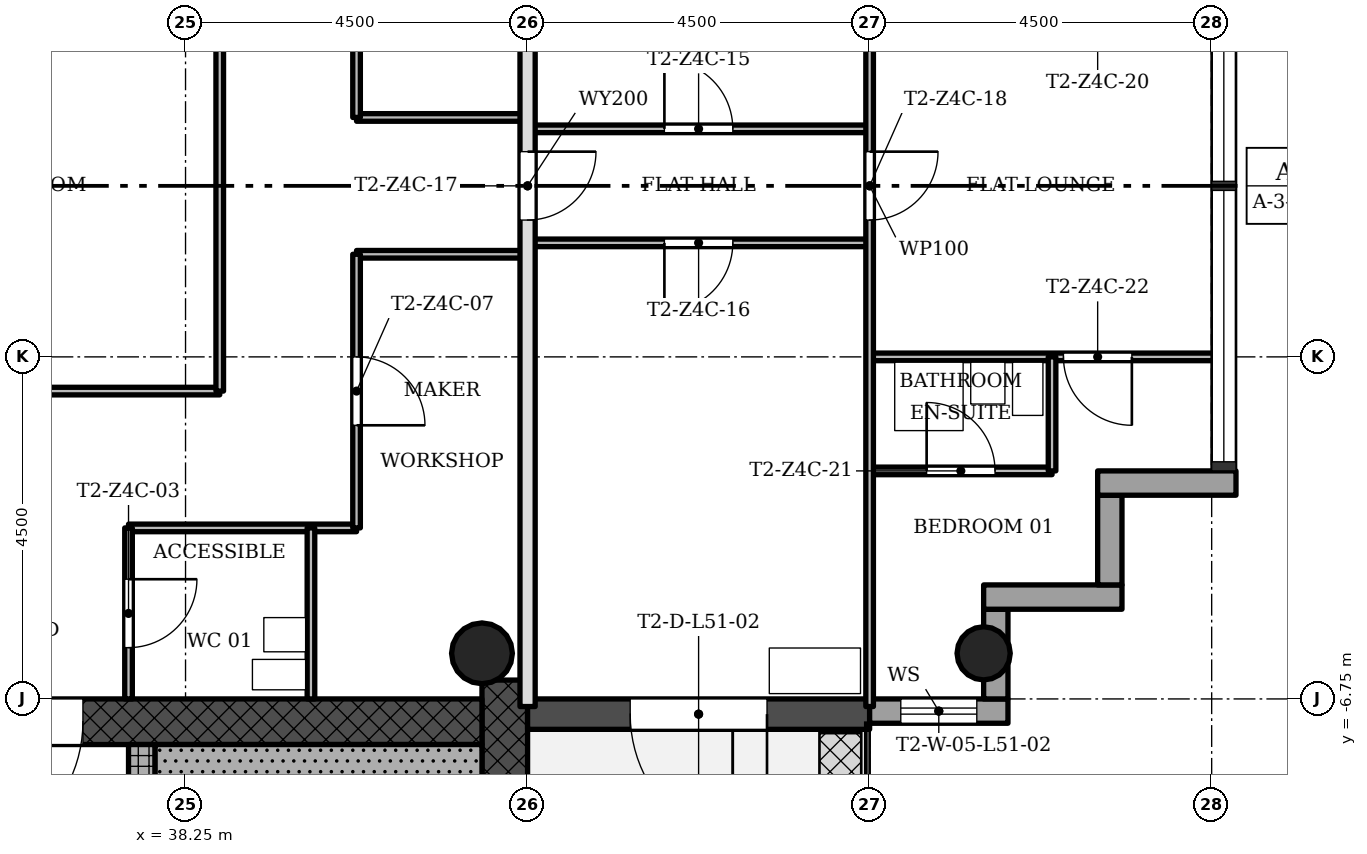
"""IFC4 building model, lengths in metres.
Left out: names, types, materials, properties, quantities, classifications, styles, units other than length and angle.
Written with IfcOpenShell. Run it as: python <this file> out.ifc"""

import sys

from ifc_helpers import new_model, si_unit, direction, frame, frame_2d, origin, origin_2d, place, context, subcontext, project, spatial, rectangle, hollow_circle, extrude, element, fill, save


model = new_model("IFC4")
c1 = context("Model", 3, precision=1e-05, world=origin(), true_north=direction((0.0, 1.0)))
c2 = subcontext(c1, "Body", "Model", "MODEL_VIEW")
j1 = project(units=[si_unit("LENGTHUNIT", "METRE"), si_unit("PLANEANGLEUNIT", "RADIAN")], contexts=[c1])
p1 = place(None, origin())
s1 = spatial("IfcSite", under=j1, at=p1, CompositionType="ELEMENT")
p2 = place(p1, origin())
s2 = spatial("IfcBuilding", under=s1, at=p2, CompositionType="ELEMENT")
p3 = place(p2, frame((0.0, 0.0, 185.8)))
s3 = spatial("IfcBuildingStorey", under=s2, at=p3, CompositionType="ELEMENT", Elevation=185.8)
p4 = place(p3, frame((42.45, -15.15, 0.0), z_axis=(0.0, 0.0, 1.0), x_axis=(0.0, 1.0, 0.0)))
e1 = element("IfcWall", 1, at=p4, inside=s3, PredefinedType="SHEAR", context=c2, shape_type="SweptSolid", body=[
    extrude(rectangle(XDim=8.648, YDim=0.6, at=frame_2d((4.324, 0.0))), origin(), (0.0, 0.0, 1.0), 3.4),
])
p5 = place(p3, frame((42.15, -7.05, 0.0), z_axis=(0.0, 0.0, 1.0), x_axis=(-1.0, 0.0, 0.0)))
e2 = element("IfcWall", 2, at=p5, inside=s3, PredefinedType="SHEAR", context=c2, shape_type="SweptSolid", body=[
    extrude(rectangle(XDim=12.9, YDim=0.6, at=frame_2d((6.45, 0.0))), origin(), (0.0, 0.0, 1.0), 3.4),
])
p6 = place(p5, frame((5.25, 0.0, 0.0)))
e3 = element("IfcOpeningElement", 3, at=p6, cuts=e2, PredefinedType="OPENING", context=c2, shape_type="SweptSolid", body=[
    extrude(rectangle(XDim=1.8, YDim=2.1, at=frame_2d((0.9, 1.05))), frame((0.0, 0.31, 0.0), z_axis=(0.0, -1.0, 0.0), x_axis=(1.0, 0.0, 0.0)), (0.0, 0.0, 1.0), 0.62),
])
p7 = place(p3, frame((37.675, -15.15, 0.0), z_axis=(0.0, 0.0, 1.0), x_axis=(0.0, 1.0, 0.0)))
e4 = element("IfcWall", 4, at=p7, inside=s3, PredefinedType="SHEAR", context=c2, shape_type="SweptSolid", body=[
    extrude(rectangle(XDim=7.8, YDim=0.35, at=frame_2d((3.9, 0.0))), origin(), (0.0, 0.0, 1.0), 3.4),
])
p8 = place(p7, frame((5.85, 0.0, 0.0)))
e5 = element("IfcOpeningElement", 5, at=p8, cuts=e4, PredefinedType="OPENING", context=c2, shape_type="SweptSolid", body=[
    extrude(rectangle(XDim=0.9, YDim=2.1, at=frame_2d((0.45, 1.05))), frame((0.0, 0.185, 0.0), z_axis=(0.0, -1.0, 0.0), x_axis=(1.0, 0.0, 0.0)), (0.0, 0.0, 1.0), 0.37),
])
p9 = place(p3, frame((48.75, -6.15, 0.0), z_axis=(0.0, 0.0, 1.0), x_axis=(1.0, 0.0, 0.0)))
e6 = element("IfcColumn", 6, at=p9, inside=s3, PredefinedType="COLUMN", context=c2, shape_type="SweptSolid", body=[
    extrude(hollow_circle(Radius=0.35, WallThickness=0.025, at=origin_2d()), origin(), (0.0, 0.0, 1.0), 3.4),
])
p10 = place(p3, frame((42.15, -6.15, 0.0), z_axis=(0.0, 0.0, 1.0), x_axis=(1.0, 0.0, 0.0)))
e7 = element("IfcColumn", 7, at=p10, inside=s3, PredefinedType="COLUMN", context=c2, shape_type="SweptSolid", body=[
    extrude(hollow_circle(Radius=0.4, WallThickness=0.028, at=origin_2d()), origin(), (0.0, 0.0, 1.0), 3.4),
])
p11 = place(p3, frame((42.75, -6.95, -0.02), z_axis=(0.0, 0.0, 1.0), x_axis=(1.0, 0.0, 0.0)))
e8 = element("IfcWall", 8, at=p11, inside=s3, PredefinedType="STANDARD", context=c2, shape_type="SweptSolid", body=[
    extrude(rectangle(XDim=4.5, YDim=0.4, at=frame_2d((2.25, 0.0))), origin(), (0.0, 0.0, 1.0), 3.12),
])
p12 = place(p11, frame((1.35, 0.0, 0.02)))
e9 = element("IfcOpeningElement", 9, at=p12, cuts=e8, PredefinedType="OPENING", context=c2, shape_type="SweptSolid", body=[
    extrude(rectangle(XDim=1.8, YDim=2.1, at=frame_2d((0.9, 1.05))), frame((0.0, 0.21, 0.0), z_axis=(0.0, -1.0, 0.0), x_axis=(1.0, 0.0, 0.0)), (0.0, 0.0, 1.0), 0.42),
])
p13 = place(p3, frame((47.25, -6.91, -0.3), z_axis=(0.0, 0.0, 1.0), x_axis=(1.0, 0.0, 0.0)))
e10 = element("IfcWall", 10, at=p13, inside=s3, PredefinedType="STANDARD", context=c2, shape_type="SweptSolid", body=[
    extrude(rectangle(XDim=1.82, YDim=0.32, at=frame_2d((0.91, 0.0))), origin(), (0.0, 0.0, 1.0), 3.4),
])
p14 = place(p13, frame((0.41, 0.0, 1.2)))
e11 = element("IfcOpeningElement", 11, at=p14, cuts=e10, PredefinedType="OPENING", context=c2, shape_type="SweptSolid", body=[
    extrude(rectangle(XDim=1.0, YDim=1.5, at=frame_2d((0.5, 0.75))), frame((0.0, 0.17, 0.0), z_axis=(0.0, -1.0, 0.0), x_axis=(1.0, 0.0, 0.0)), (0.0, 0.0, 1.0), 0.34),
])
p15 = place(p3, frame((48.91, -6.75, -0.3), z_axis=(0.0, 0.0, 1.0), x_axis=(0.0, 1.0, 0.0)))
e12 = element("IfcWall", 12, at=p15, inside=s3, PredefinedType="STANDARD", context=c2, shape_type="SweptSolid", body=[
    extrude(rectangle(XDim=1.18, YDim=0.32, at=frame_2d((0.59, 0.0))), origin(), (0.0, 0.0, 1.0), 3.4),
])
p16 = place(p3, frame((48.75, -5.41, -0.3), z_axis=(0.0, 0.0, 1.0), x_axis=(1.0, 0.0, 0.0)))
e13 = element("IfcWall", 13, at=p16, inside=s3, PredefinedType="STANDARD", context=c2, shape_type="SweptSolid", body=[
    extrude(rectangle(XDim=1.82, YDim=0.32, at=frame_2d((0.91, 0.0))), origin(), (0.0, 0.0, 1.0), 3.4),
])
p17 = place(p3, frame((50.41, -5.25, -0.3), z_axis=(0.0, 0.0, 1.0), x_axis=(0.0, 1.0, 0.0)))
e14 = element("IfcWall", 14, at=p17, inside=s3, PredefinedType="STANDARD", context=c2, shape_type="SweptSolid", body=[
    extrude(rectangle(XDim=1.18, YDim=0.32, at=frame_2d((0.59, 0.0))), origin(), (0.0, 0.0, 1.0), 3.4),
])
p18 = place(p3, frame((50.25, -3.91, -0.3), z_axis=(0.0, 0.0, 1.0), x_axis=(1.0, 0.0, 0.0)))
e15 = element("IfcWall", 15, at=p18, inside=s3, PredefinedType="STANDARD", context=c2, shape_type="SweptSolid", body=[
    extrude(rectangle(XDim=1.82, YDim=0.32, at=frame_2d((0.91, 0.0))), origin(), (0.0, 0.0, 1.0), 3.4),
])
p19 = place(p3, frame((40.5, -4.5, 0.0), z_axis=(0.0, 0.0, 1.0), x_axis=(-1.0, 0.0, 0.0)))
e16 = element("IfcWall", 16, at=p19, inside=s3, PredefinedType="PARTITIONING", context=c2, shape_type="SweptSolid", body=[
    extrude(rectangle(XDim=3.0, YDim=0.1, at=frame_2d((1.5, 0.0))), origin(), (0.0, 0.0, 1.0), 3.0),
])
p20 = place(p3, frame((49.65, -3.75, 0.0), z_axis=(0.0, 0.0, 1.0), x_axis=(-1.0, 0.0, 0.0)))
e17 = element("IfcWall", 17, at=p20, inside=s3, PredefinedType="PARTITIONING", context=c2, shape_type="SweptSolid", body=[
    extrude(rectangle(XDim=2.4, YDim=0.1, at=frame_2d((1.2, 0.0))), origin(), (0.0, 0.0, 1.0), 3.0),
])
p21 = place(p20, frame((0.75, 0.0, 0.0)))
e18 = element("IfcOpeningElement", 18, at=p21, cuts=e17, PredefinedType="OPENING", context=c2, shape_type="SweptSolid", body=[
    extrude(rectangle(XDim=0.9, YDim=2.1, at=frame_2d((0.45, 1.05))), frame((0.0, 0.06, 0.0), z_axis=(0.0, -1.0, 0.0), x_axis=(1.0, 0.0, 0.0)), (0.0, 0.0, 1.0), 0.12),
])
p22 = place(p3, frame((38.7, -2.7, 0.0), z_axis=(0.0, 0.0, 1.0), x_axis=(-1.0, 0.0, 0.0)))
e19 = element("IfcWall", 19, at=p22, inside=s3, PredefinedType="PARTITIONING", context=c2, shape_type="SweptSolid", body=[
    extrude(rectangle(XDim=5.4, YDim=0.1, at=frame_2d((2.7, 0.0))), origin(), (0.0, 0.0, 1.0), 3.0),
])
p23 = place(p3, frame((51.85, -2.25, 0.0), z_axis=(0.0, 0.0, 1.0), x_axis=(-1.0, 0.0, 0.0)))
e20 = element("IfcWall", 20, at=p23, inside=s3, PredefinedType="PARTITIONING", context=c2, shape_type="SweptSolid", body=[
    extrude(rectangle(XDim=4.6, YDim=0.1, at=frame_2d((2.3, 0.0))), origin(), (0.0, 0.0, 1.0), 3.0),
])
p24 = place(p23, frame((1.15, 0.0, 0.0)))
e21 = element("IfcOpeningElement", 21, at=p24, cuts=e20, PredefinedType="OPENING", context=c2, shape_type="SweptSolid", body=[
    extrude(rectangle(XDim=0.9, YDim=2.1, at=frame_2d((0.45, 1.05))), frame((0.0, 0.06, 0.0), z_axis=(0.0, -1.0, 0.0), x_axis=(1.0, 0.0, 0.0)), (0.0, 0.0, 1.0), 0.12),
])
p25 = place(p3, frame((42.75, -0.9, 0.0), z_axis=(0.0, 0.0, 1.0), x_axis=(-1.0, 0.0, 0.0)))
e22 = element("IfcWall", 22, at=p25, inside=s3, PredefinedType="PARTITIONING", context=c2, shape_type="SweptSolid", body=[
    extrude(rectangle(XDim=2.25, YDim=0.1, at=frame_2d((1.125, 0.0))), origin(), (0.0, 0.0, 1.0), 3.0),
])
p26 = place(p3, frame((47.25, -0.75, 0.0), z_axis=(0.0, 0.0, 1.0), x_axis=(-1.0, 0.0, 0.0)))
e23 = element("IfcWall", 23, at=p26, inside=s3, PredefinedType="PARTITIONING", context=c2, shape_type="SweptSolid", body=[
    extrude(rectangle(XDim=4.5, YDim=0.1, at=frame_2d((2.25, 0.0))), origin(), (0.0, 0.0, 1.0), 3.0),
])
p27 = place(p26, frame((1.8, 0.0, 0.0)))
e24 = element("IfcOpeningElement", 24, at=p27, cuts=e23, PredefinedType="OPENING", context=c2, shape_type="SweptSolid", body=[
    extrude(rectangle(XDim=0.9, YDim=2.1, at=frame_2d((0.45, 1.05))), frame((0.0, 0.06, 0.0), z_axis=(0.0, -1.0, 0.0), x_axis=(1.0, 0.0, 0.0)), (0.0, 0.0, 1.0), 0.12),
])
p28 = place(p3, frame((47.25, 0.75, 0.0), z_axis=(0.0, 0.0, 1.0), x_axis=(-1.0, 0.0, 0.0)))
e25 = element("IfcWall", 25, at=p28, inside=s3, PredefinedType="PARTITIONING", context=c2, shape_type="SweptSolid", body=[
    extrude(rectangle(XDim=4.5, YDim=0.1, at=frame_2d((2.25, 0.0))), origin(), (0.0, 0.0, 1.0), 3.0),
])
p29 = place(p28, frame((1.8, 0.0, 0.0)))
e26 = element("IfcOpeningElement", 26, at=p29, cuts=e25, PredefinedType="OPENING", context=c2, shape_type="SweptSolid", body=[
    extrude(rectangle(XDim=0.9, YDim=2.1, at=frame_2d((0.45, 1.05))), frame((0.0, 0.06, 0.0), z_axis=(0.0, -1.0, 0.0), x_axis=(1.0, 0.0, 0.0)), (0.0, 0.0, 1.0), 0.12),
])
p30 = place(p3, frame((42.75, 0.9, 0.0), z_axis=(0.0, 0.0, 1.0), x_axis=(-1.0, 0.0, 0.0)))
e27 = element("IfcWall", 27, at=p30, inside=s3, PredefinedType="PARTITIONING", context=c2, shape_type="SweptSolid", body=[
    extrude(rectangle(XDim=2.25, YDim=0.1, at=frame_2d((1.125, 0.0))), origin(), (0.0, 0.0, 1.0), 3.0),
])
p31 = place(p3, frame((49.65, -3.75, 0.0), z_axis=(0.0, 0.0, 1.0), x_axis=(0.0, 1.0, 0.0)))
e28 = element("IfcWall", 28, at=p31, inside=s3, PredefinedType="PARTITIONING", context=c2, shape_type="SweptSolid", body=[
    extrude(rectangle(XDim=1.5, YDim=0.1, at=frame_2d((0.75, 0.0))), origin(), (0.0, 0.0, 1.0), 3.0),
])
p32 = place(p3, frame((47.25, -6.85, 0.0), z_axis=(0.0, 0.0, 1.0), x_axis=(0.0, 1.0, 0.0)))
e29 = element("IfcWall", 29, at=p32, inside=s3, PredefinedType="PARTITIONING", context=c2, shape_type="SweptSolid", body=[
    extrude(rectangle(XDim=13.7, YDim=0.1, at=frame_2d((6.85, 0.0))), origin(), (0.0, 0.0, 1.0), 3.0),
])
p33 = place(p32, frame((6.4, 0.0, 0.0)))
e30 = element("IfcOpeningElement", 30, at=p33, cuts=e29, PredefinedType="OPENING", context=c2, shape_type="SweptSolid", body=[
    extrude(rectangle(XDim=0.9, YDim=2.1, at=frame_2d((0.45, 1.05))), frame((0.0, 0.06, 0.0), z_axis=(0.0, -1.0, 0.0), x_axis=(1.0, 0.0, 0.0)), (0.0, 0.0, 1.0), 0.12),
])
p34 = place(p3, frame((42.75, -6.85, 0.0), z_axis=(0.0, 0.0, 1.0), x_axis=(0.0, 1.0, 0.0)))
e31 = element("IfcWall", 31, at=p34, inside=s3, PredefinedType="SOLIDWALL", context=c2, shape_type="SweptSolid", body=[
    extrude(rectangle(XDim=13.7, YDim=0.2, at=frame_2d((6.85, 0.0))), origin(), (0.0, 0.0, 1.0), 3.0),
])
p35 = place(p34, frame((6.4, 0.0, 0.0)))
e32 = element("IfcOpeningElement", 32, at=p35, cuts=e31, PredefinedType="OPENING", context=c2, shape_type="SweptSolid", body=[
    extrude(rectangle(XDim=0.9, YDim=2.1, at=frame_2d((0.45, 1.05))), frame((0.0, 0.11, 0.0), z_axis=(0.0, -1.0, 0.0), x_axis=(1.0, 0.0, 0.0)), (0.0, 0.0, 1.0), 0.22),
])
p36 = place(p3, frame((40.5, -4.5, 0.0), z_axis=(0.0, 0.0, 1.0), x_axis=(0.0, 1.0, 0.0)))
e33 = element("IfcWall", 33, at=p36, inside=s3, PredefinedType="PARTITIONING", context=c2, shape_type="SweptSolid", body=[
    extrude(rectangle(XDim=3.6, YDim=0.1, at=frame_2d((1.8, 0.0))), origin(), (0.0, 0.0, 1.0), 3.0),
])
p37 = place(p36, frame((1.35, 0.0, 0.0)))
e34 = element("IfcOpeningElement", 34, at=p37, cuts=e33, PredefinedType="OPENING", context=c2, shape_type="SweptSolid", body=[
    extrude(rectangle(XDim=0.9, YDim=2.1, at=frame_2d((0.45, 1.05))), frame((0.0, 0.06, 0.0), z_axis=(0.0, -1.0, 0.0), x_axis=(1.0, 0.0, 0.0)), (0.0, 0.0, 1.0), 0.12),
])
p38 = place(p3, frame((40.5, 0.9, 0.0), z_axis=(0.0, 0.0, 1.0), x_axis=(0.0, 1.0, 0.0)))
e35 = element("IfcWall", 35, at=p38, inside=s3, PredefinedType="PARTITIONING", context=c2, shape_type="SweptSolid", body=[
    extrude(rectangle(XDim=3.6, YDim=0.1, at=frame_2d((1.8, 0.0))), origin(), (0.0, 0.0, 1.0), 3.0),
])
p39 = place(p38, frame((1.35, 0.0, 0.0)))
e36 = element("IfcOpeningElement", 36, at=p39, cuts=e35, PredefinedType="OPENING", context=c2, shape_type="SweptSolid", body=[
    extrude(rectangle(XDim=0.9, YDim=2.1, at=frame_2d((0.45, 1.05))), frame((0.0, 0.06, 0.0), z_axis=(0.0, -1.0, 0.0), x_axis=(1.0, 0.0, 0.0)), (0.0, 0.0, 1.0), 0.12),
])
p40 = place(p3, frame((39.9, -6.75, 0.0), z_axis=(0.0, 0.0, 1.0), x_axis=(0.0, 1.0, 0.0)))
e37 = element("IfcWall", 37, at=p40, inside=s3, PredefinedType="PARTITIONING", context=c2, shape_type="SweptSolid", body=[
    extrude(rectangle(XDim=2.25, YDim=0.1, at=frame_2d((1.125, 0.0))), origin(), (0.0, 0.0, 1.0), 3.0),
])
p41 = place(p3, frame((38.7, -2.7, 0.0), z_axis=(0.0, 0.0, 1.0), x_axis=(0.0, 1.0, 0.0)))
e38 = element("IfcWall", 38, at=p41, inside=s3, PredefinedType="PARTITIONING", context=c2, shape_type="SweptSolid", body=[
    extrude(rectangle(XDim=5.4, YDim=0.1, at=frame_2d((2.7, 0.0))), origin(), (0.0, 0.0, 1.0), 3.0),
])
p42 = place(p3, frame((37.5, -6.75, 0.0), z_axis=(0.0, 0.0, 1.0), x_axis=(0.0, 1.0, 0.0)))
e39 = element("IfcWall", 39, at=p42, inside=s3, PredefinedType="PARTITIONING", context=c2, shape_type="SweptSolid", body=[
    extrude(rectangle(XDim=2.25, YDim=0.1, at=frame_2d((1.125, 0.0))), origin(), (0.0, 0.0, 1.0), 3.0),
])
p43 = place(p42, frame((0.675, 0.0, 0.0)))
e40 = element("IfcOpeningElement", 40, at=p43, cuts=e39, PredefinedType="OPENING", context=c2, shape_type="SweptSolid", body=[
    extrude(rectangle(XDim=0.9, YDim=2.1, at=frame_2d((0.45, 1.05))), frame((0.0, 0.06, 0.0), z_axis=(0.0, -1.0, 0.0), x_axis=(1.0, 0.0, 0.0)), (0.0, 0.0, 1.0), 0.12),
])
p44 = place(p3, frame((37.85, -7.65, 0.0), z_axis=(0.0, 0.0, 1.0), x_axis=(1.0, 0.0, 0.0)))
e41 = element("IfcWall", 41, at=p44, inside=s3, PredefinedType="SHEAR", context=c2, shape_type="SweptSolid", body=[
    extrude(rectangle(XDim=4.3, YDim=0.6, at=frame_2d((2.15, 0.0))), origin(), (0.0, 0.0, 1.0), 3.4),
])
p45 = place(p12, origin())
e42 = element("IfcDoor", 42, at=p45, inside=s3, OperationType="SINGLE_SWING_RIGHT", PredefinedType="DOOR", context=c2, shape_type="SweptSolid", body=[
    extrude(rectangle(XDim=1.8, YDim=2.1, at=frame_2d((0.9, 1.05))), frame((0.0, 0.025, 0.0), z_axis=(0.0, -1.0, 0.0), x_axis=(1.0, 0.0, 0.0)), (0.0, 0.0, 1.0), 0.05),
])
fill(e9, e42)
p46 = place(p43, origin())
e43 = element("IfcDoor", 43, at=p46, inside=s3, OperationType="SINGLE_SWING_RIGHT", PredefinedType="DOOR", context=c2, shape_type="SweptSolid", body=[
    extrude(rectangle(XDim=0.9, YDim=2.1, at=frame_2d((0.45, 1.05))), frame((0.0, 0.025, 0.0), z_axis=(0.0, -1.0, 0.0), x_axis=(1.0, 0.0, 0.0)), (0.0, 0.0, 1.0), 0.05),
])
fill(e40, e43)
p47 = place(p37, origin())
e44 = element("IfcDoor", 44, at=p47, inside=s3, OperationType="SINGLE_SWING_LEFT", PredefinedType="DOOR", context=c2, shape_type="SweptSolid", body=[
    extrude(rectangle(XDim=0.9, YDim=2.1, at=frame_2d((0.45, 1.05))), frame((0.0, 0.025, 0.0), z_axis=(0.0, -1.0, 0.0), x_axis=(1.0, 0.0, 0.0)), (0.0, 0.0, 1.0), 0.05),
])
fill(e34, e44)
p48 = place(p29, origin())
e45 = element("IfcDoor", 45, at=p48, inside=s3, OperationType="SINGLE_SWING_RIGHT", PredefinedType="DOOR", context=c2, shape_type="SweptSolid", body=[
    extrude(rectangle(XDim=0.9, YDim=2.1, at=frame_2d((0.45, 1.05))), frame((0.0, 0.025, 0.0), z_axis=(0.0, -1.0, 0.0), x_axis=(1.0, 0.0, 0.0)), (0.0, 0.0, 1.0), 0.05),
])
fill(e26, e45)
p49 = place(p27, origin())
e46 = element("IfcDoor", 46, at=p49, inside=s3, OperationType="SINGLE_SWING_LEFT", PredefinedType="DOOR", context=c2, shape_type="SweptSolid", body=[
    extrude(rectangle(XDim=0.9, YDim=2.1, at=frame_2d((0.45, 1.05))), frame((0.0, 0.025, 0.0), z_axis=(0.0, -1.0, 0.0), x_axis=(1.0, 0.0, 0.0)), (0.0, 0.0, 1.0), 0.05),
])
fill(e24, e46)
p50 = place(p35, origin())
e47 = element("IfcDoor", 47, at=p50, inside=s3, OperationType="SINGLE_SWING_RIGHT", PredefinedType="DOOR", context=c2, shape_type="SweptSolid", body=[
    extrude(rectangle(XDim=0.9, YDim=2.1, at=frame_2d((0.45, 1.05))), frame((0.0, 0.025, 0.0), z_axis=(0.0, -1.0, 0.0), x_axis=(1.0, 0.0, 0.0)), (0.0, 0.0, 1.0), 0.05),
])
fill(e32, e47)
p51 = place(p33, origin())
e48 = element("IfcDoor", 48, at=p51, inside=s3, OperationType="SINGLE_SWING_RIGHT", PredefinedType="DOOR", context=c2, shape_type="SweptSolid", body=[
    extrude(rectangle(XDim=0.9, YDim=2.1, at=frame_2d((0.45, 1.05))), frame((0.0, 0.025, 0.0), z_axis=(0.0, -1.0, 0.0), x_axis=(1.0, 0.0, 0.0)), (0.0, 0.0, 1.0), 0.05),
])
fill(e30, e48)
p52 = place(p21, origin())
e49 = element("IfcDoor", 49, at=p52, inside=s3, OperationType="SINGLE_SWING_RIGHT", PredefinedType="DOOR", context=c2, shape_type="SweptSolid", body=[
    extrude(rectangle(XDim=0.9, YDim=2.1, at=frame_2d((0.45, 1.05))), frame((0.0, 0.025, 0.0), z_axis=(0.0, -1.0, 0.0), x_axis=(1.0, 0.0, 0.0)), (0.0, 0.0, 1.0), 0.05),
])
fill(e18, e49)
p53 = place(p24, origin())
e50 = element("IfcDoor", 50, at=p53, inside=s3, OperationType="SINGLE_SWING_RIGHT", PredefinedType="DOOR", context=c2, shape_type="SweptSolid", body=[
    extrude(rectangle(XDim=0.9, YDim=2.1, at=frame_2d((0.45, 1.05))), frame((0.0, 0.025, 0.0), z_axis=(0.0, -1.0, 0.0), x_axis=(1.0, 0.0, 0.0)), (0.0, 0.0, 1.0), 0.05),
])
fill(e21, e50)
p54 = place(p6, origin())
e51 = element("IfcDoor", 51, at=p54, inside=s3, OperationType="SINGLE_SWING_LEFT", PredefinedType="DOOR", context=c2, shape_type="SweptSolid", body=[
    extrude(rectangle(XDim=1.8, YDim=2.1, at=frame_2d((0.9, 1.05))), frame((0.0, 0.025, 0.0), z_axis=(0.0, -1.0, 0.0), x_axis=(1.0, 0.0, 0.0)), (0.0, 0.0, 1.0), 0.05),
])
fill(e3, e51)
p55 = place(p14, origin())
e52 = element("IfcWindow", 52, at=p55, inside=s3, PartitioningType="SINGLE_PANEL", PredefinedType="WINDOW", context=c2, shape_type="SweptSolid", body=[
    extrude(rectangle(XDim=1.0, YDim=1.5, at=frame_2d((0.5, 0.75))), frame((0.0, 0.03, 0.0), z_axis=(0.0, -1.0, 0.0), x_axis=(1.0, 0.0, 0.0)), (0.0, 0.0, 1.0), 0.06),
])
fill(e11, e52)
save(model, sys.argv[1])
